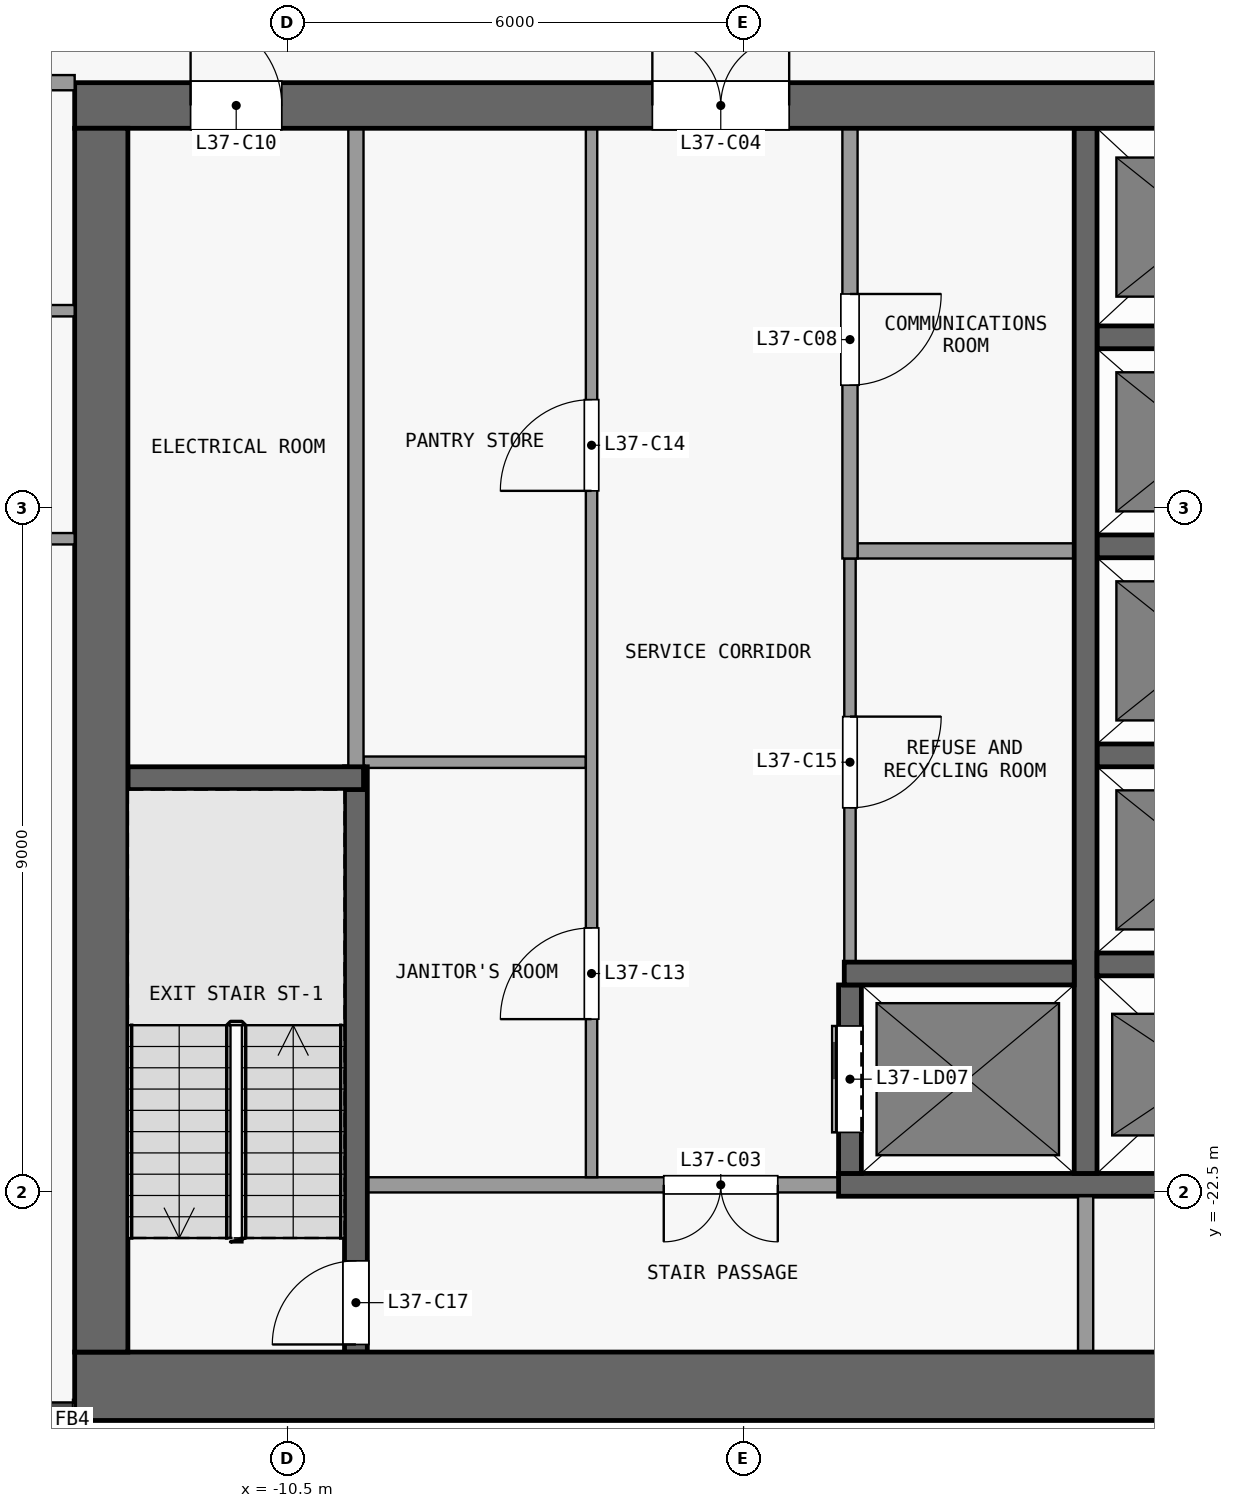
"""IFC4 building model, lengths in metres.
Left out: names, types, materials, properties, quantities, classifications, styles, units other than length and angle.
Written with IfcOpenShell. Run it as: python <this file> out.ifc"""

import sys

from ifc_helpers import new_model, si_unit, direction, frame, frame_2d, origin, place, context, subcontext, project, spatial, rectangle, extrude, element, fill, save


model = new_model("IFC4")
c1 = context("Model", 3, precision=1e-05, world=origin(), true_north=direction((0.0, 1.0)))
c2 = subcontext(c1, "Body", "Model", "MODEL_VIEW")
j1 = project(units=[si_unit("LENGTHUNIT", "METRE"), si_unit("PLANEANGLEUNIT", "RADIAN")], contexts=[c1])
p1 = place(None, origin())
s1 = spatial("IfcSite", under=j1, at=p1, CompositionType="ELEMENT")
p2 = place(p1, origin())
s2 = spatial("IfcBuilding", under=s1, at=p2, CompositionType="ELEMENT")
p3 = place(p2, frame((0.0, 0.0, 152.9)))
s3 = spatial("IfcBuildingStorey", under=s2, at=p3, CompositionType="ELEMENT", Elevation=152.9)
p4 = place(p3, frame((-13.3, -25.05, 0.0), z_axis=(0.0, 0.0, 1.0), x_axis=(1.0, 0.0, 0.0)))
e1 = element("IfcWall", 1, at=p4, inside=s3, PredefinedType="SHEAR", context=c2, shape_type="SweptSolid", body=[
    extrude(rectangle(XDim=26.6, YDim=0.9, at=frame_2d((13.3, 0.0))), origin(), (0.0, 0.0, 1.0), 3.3),
])
p5 = place(p3, frame((-13.3, -8.2, 0.0), z_axis=(0.0, 0.0, 1.0), x_axis=(1.0, 0.0, 0.0)))
e2 = element("IfcWall", 2, at=p5, inside=s3, PredefinedType="SHEAR", context=c2, shape_type="SweptSolid", body=[
    extrude(rectangle(XDim=26.6, YDim=0.6, at=frame_2d((13.3, 0.0))), origin(), (0.0, 0.0, 1.0), 3.3),
])
p6 = place(p5, frame((7.6, 0.0, 0.0)))
e3 = element("IfcOpeningElement", 3, at=p6, cuts=e2, PredefinedType="OPENING", context=c2, shape_type="SweptSolid", body=[
    extrude(rectangle(XDim=1.8, YDim=2.1, at=frame_2d((0.9, 1.05))), frame((0.0, 0.31, 0.0), z_axis=(0.0, -1.0, 0.0), x_axis=(1.0, 0.0, 0.0)), (0.0, 0.0, 1.0), 0.62),
])
p7 = place(p5, frame((17.2, 0.0, 0.0)))
e4 = element("IfcOpeningElement", 4, at=p7, cuts=e2, PredefinedType="OPENING", context=c2, shape_type="SweptSolid", body=[
    extrude(rectangle(XDim=1.8, YDim=2.1, at=frame_2d((0.9, 1.05))), frame((0.0, 0.31, 0.0), z_axis=(0.0, -1.0, 0.0), x_axis=(1.0, 0.0, 0.0)), (0.0, 0.0, 1.0), 0.62),
])
p8 = place(p5, frame((1.525, 0.0, 0.0)))
e5 = element("IfcOpeningElement", 5, at=p8, cuts=e2, PredefinedType="OPENING", context=c2, shape_type="SweptSolid", body=[
    extrude(rectangle(XDim=1.2, YDim=2.1, at=frame_2d((0.6, 1.05))), frame((0.0, 0.31, 0.0), z_axis=(0.0, -1.0, 0.0), x_axis=(1.0, 0.0, 0.0)), (0.0, 0.0, 1.0), 0.62),
])
p9 = place(p5, frame((23.175, 0.0, 0.0)))
e6 = element("IfcOpeningElement", 6, at=p9, cuts=e2, PredefinedType="OPENING", context=c2, shape_type="SweptSolid", body=[
    extrude(rectangle(XDim=0.9, YDim=2.1, at=frame_2d((0.45, 1.05))), frame((0.0, 0.31, 0.0), z_axis=(0.0, -1.0, 0.0), x_axis=(1.0, 0.0, 0.0)), (0.0, 0.0, 1.0), 0.62),
])
p10 = place(p3, frame((-12.95, -24.6, 0.0), z_axis=(0.0, 0.0, 1.0), x_axis=(0.0, 1.0, 0.0)))
e7 = element("IfcWall", 7, at=p10, inside=s3, PredefinedType="SHEAR", context=c2, shape_type="SweptSolid", body=[
    extrude(rectangle(XDim=16.1, YDim=0.7, at=frame_2d((8.05, 0.0))), origin(), (0.0, 0.0, 1.0), 3.3),
])
p11 = place(p3, frame((-3.25, -22.4, 0.0), z_axis=(0.0, 0.0, 1.0), x_axis=(-1.0, 0.0, 0.0)))
e8 = element("IfcWall", 8, at=p11, inside=s3, PredefinedType="PARTITIONING", context=c2, shape_type="SweptSolid", body=[
    extrude(rectangle(XDim=6.2, YDim=0.2, at=frame_2d((3.1, 0.0))), origin(), (0.0, 0.0, 1.0), 3.3),
])
p12 = place(p11, frame((0.8, 0.0, 0.0)))
e9 = element("IfcOpeningElement", 9, at=p12, cuts=e8, PredefinedType="OPENING", context=c2, shape_type="SweptSolid", body=[
    extrude(rectangle(XDim=1.5, YDim=2.1, at=frame_2d((0.75, 1.05))), frame((0.0, 0.11, 0.0), z_axis=(0.0, -1.0, 0.0), x_axis=(1.0, 0.0, 0.0)), (0.0, 0.0, 1.0), 0.22),
])
p13 = place(p3, frame((-3.25, -22.4, 0.0), z_axis=(0.0, 0.0, 1.0), x_axis=(1.0, 0.0, 0.0)))
e10 = element("IfcWall", 10, at=p13, inside=s3, PredefinedType="SHEAR", context=c2, shape_type="SweptSolid", body=[
    extrude(rectangle(XDim=6.2, YDim=0.3, at=frame_2d((3.1, 0.0))), origin(), (0.0, 0.0, 1.0), 3.3),
])
p14 = place(p3, frame((-3.175, -19.62, 0.0), z_axis=(0.0, 0.0, 1.0), x_axis=(1.0, 0.0, 0.0)))
e11 = element("IfcWall", 11, at=p14, inside=s3, PredefinedType="SHEAR", context=c2, shape_type="SweptSolid", body=[
    extrude(rectangle(XDim=3.025, YDim=0.3, at=frame_2d((1.513, 0.0))), origin(), (0.0, 0.0, 1.0), 3.3),
])
p15 = place(p3, frame((0.15, -19.5, 0.0), z_axis=(0.0, 0.0, 1.0), x_axis=(1.0, 0.0, 0.0)))
e12 = element("IfcWall", 12, at=p15, inside=s3, PredefinedType="SHEAR", context=c2, shape_type="SweptSolid", body=[
    extrude(rectangle(XDim=2.8, YDim=0.3, at=frame_2d((1.4, 0.0))), origin(), (0.0, 0.0, 1.0), 3.3),
])
p16 = place(p3, frame((-12.6, -17.05, 0.0), z_axis=(0.0, 0.0, 1.0), x_axis=(1.0, 0.0, 0.0)))
e13 = element("IfcWall", 13, at=p16, inside=s3, PredefinedType="SHEAR", context=c2, shape_type="SweptSolid", body=[
    extrude(rectangle(XDim=3.1, YDim=0.3, at=frame_2d((1.55, 0.0))), origin(), (0.0, 0.0, 1.0), 3.3),
])
p17 = place(p3, frame((-9.5, -16.84, 0.0), z_axis=(0.0, 0.0, 1.0), x_axis=(1.0, 0.0, 0.0)))
e14 = element("IfcWall", 14, at=p17, inside=s3, PredefinedType="PARTITIONING", context=c2, shape_type="SweptSolid", body=[
    extrude(rectangle(XDim=2.925, YDim=0.15, at=frame_2d((1.462, 0.0))), origin(), (0.0, 0.0, 1.0), 3.3),
])
p18 = place(p3, frame((0.15, -16.75, 0.0), z_axis=(0.0, 0.0, 1.0), x_axis=(1.0, 0.0, 0.0)))
e15 = element("IfcWall", 15, at=p18, inside=s3, PredefinedType="SHEAR", context=c2, shape_type="SweptSolid", body=[
    extrude(rectangle(XDim=2.8, YDim=0.3, at=frame_2d((1.4, 0.0))), origin(), (0.0, 0.0, 1.0), 3.3),
])
p19 = place(p3, frame((-3.0, -14.06, 0.0), z_axis=(0.0, 0.0, 1.0), x_axis=(1.0, 0.0, 0.0)))
e16 = element("IfcWall", 16, at=p19, inside=s3, PredefinedType="PARTITIONING", context=c2, shape_type="SweptSolid", body=[
    extrude(rectangle(XDim=2.85, YDim=0.2, at=frame_2d((1.425, 0.0))), origin(), (0.0, 0.0, 1.0), 3.3),
])
for number, where, z_axis, x_axis in (
    (17, (0.15, -14.0, 0.0), (0.0, 0.0, 1.0), (1.0, 0.0, 0.0)),
    (18, (0.15, -11.25, 0.0), (0.0, 0.0, 1.0), (1.0, 0.0, 0.0)),
):
    element("IfcWall", number, at=place(p3, frame(where, z_axis=z_axis, x_axis=x_axis)), inside=s3, PredefinedType="SHEAR", context=c2, shape_type="SweptSolid", body=[
        extrude(rectangle(XDim=2.8, YDim=0.3, at=frame_2d((1.4, 0.0))), origin(), (0.0, 0.0, 1.0), 3.3),
    ])
p20 = place(p3, frame((-9.6, -24.6, 0.0), z_axis=(0.0, 0.0, 1.0), x_axis=(0.0, 1.0, 0.0)))
e19 = element("IfcWall", 19, at=p20, inside=s3, PredefinedType="SHEAR", context=c2, shape_type="SweptSolid", body=[
    extrude(rectangle(XDim=7.7, YDim=0.3, at=frame_2d((3.85, 0.0))), origin(), (0.0, 0.0, 1.0), 3.3),
])
p21 = place(p20, frame((0.1, 0.0, 0.0)))
e20 = element("IfcOpeningElement", 20, at=p21, cuts=e19, PredefinedType="OPENING", context=c2, shape_type="SweptSolid", body=[
    extrude(rectangle(XDim=1.1, YDim=2.1, at=frame_2d((0.55, 1.05))), frame((0.0, 0.16, 0.0), z_axis=(0.0, -1.0, 0.0), x_axis=(1.0, 0.0, 0.0)), (0.0, 0.0, 1.0), 0.32),
])
p22 = place(p3, frame((-9.6, -16.9, 0.0), z_axis=(0.0, 0.0, 1.0), x_axis=(0.0, 1.0, 0.0)))
e21 = element("IfcWall", 21, at=p22, inside=s3, PredefinedType="PARTITIONING", context=c2, shape_type="SweptSolid", body=[
    extrude(rectangle(XDim=8.4, YDim=0.2, at=frame_2d((4.2, 0.0))), origin(), (0.0, 0.0, 1.0), 3.3),
])
p23 = place(p3, frame((-6.5, -22.3, 0.0), z_axis=(0.0, 0.0, 1.0), x_axis=(0.0, 1.0, 0.0)))
e22 = element("IfcWall", 22, at=p23, inside=s3, PredefinedType="PARTITIONING", context=c2, shape_type="SweptSolid", body=[
    extrude(rectangle(XDim=13.8, YDim=0.15, at=frame_2d((6.9, 0.0))), origin(), (0.0, 0.0, 1.0), 3.3),
])
p24 = place(p23, frame((2.08, 0.0, 0.0)))
e23 = element("IfcOpeningElement", 23, at=p24, cuts=e22, PredefinedType="OPENING", context=c2, shape_type="SweptSolid", body=[
    extrude(rectangle(XDim=1.2, YDim=2.1, at=frame_2d((0.6, 1.05))), frame((0.0, 0.085, 0.0), z_axis=(0.0, -1.0, 0.0), x_axis=(1.0, 0.0, 0.0)), (0.0, 0.0, 1.0), 0.17),
])
p25 = place(p23, frame((9.03, 0.0, 0.0)))
e24 = element("IfcOpeningElement", 24, at=p25, cuts=e22, PredefinedType="OPENING", context=c2, shape_type="SweptSolid", body=[
    extrude(rectangle(XDim=1.2, YDim=2.1, at=frame_2d((0.6, 1.05))), frame((0.0, 0.085, 0.0), z_axis=(0.0, -1.0, 0.0), x_axis=(1.0, 0.0, 0.0)), (0.0, 0.0, 1.0), 0.17),
])
p26 = place(p3, frame((-3.1, -22.25, 0.0), z_axis=(0.0, 0.0, 1.0), x_axis=(0.0, 1.0, 0.0)))
e25 = element("IfcWall", 25, at=p26, inside=s3, PredefinedType="SHEAR", context=c2, shape_type="SweptSolid", body=[
    extrude(rectangle(XDim=2.48, YDim=0.3, at=frame_2d((1.24, 0.0))), origin(), (0.0, 0.0, 1.0), 3.3),
])
p27 = place(p26, frame((0.54, 0.0, 0.0)))
e26 = element("IfcOpeningElement", 26, at=p27, cuts=e25, PredefinedType="OPENING", context=c2, shape_type="SweptSolid", body=[
    extrude(rectangle(XDim=1.4, YDim=2.1, at=frame_2d((0.7, 1.05))), frame((0.0, 0.16, 0.0), z_axis=(0.0, -1.0, 0.0), x_axis=(1.0, 0.0, 0.0)), (0.0, 0.0, 1.0), 0.32),
])
p28 = place(p3, frame((-3.1, -14.16, 0.0), z_axis=(0.0, 0.0, 1.0), x_axis=(0.0, -1.0, 0.0)))
e27 = element("IfcWall", 27, at=p28, inside=s3, PredefinedType="PARTITIONING", context=c2, shape_type="SweptSolid", body=[
    extrude(rectangle(XDim=5.31, YDim=0.15, at=frame_2d((2.655, 0.0))), origin(), (0.0, 0.0, 1.0), 3.3),
])
p29 = place(p28, frame((2.08, 0.0, 0.0)))
e28 = element("IfcOpeningElement", 28, at=p29, cuts=e27, PredefinedType="OPENING", context=c2, shape_type="SweptSolid", body=[
    extrude(rectangle(XDim=1.2, YDim=2.1, at=frame_2d((0.6, 1.05))), frame((0.0, 0.085, 0.0), z_axis=(0.0, -1.0, 0.0), x_axis=(1.0, 0.0, 0.0)), (0.0, 0.0, 1.0), 0.17),
])
p30 = place(p3, frame((-3.1, -8.5, 0.0), z_axis=(0.0, 0.0, 1.0), x_axis=(0.0, -1.0, 0.0)))
e29 = element("IfcWall", 29, at=p30, inside=s3, PredefinedType="PARTITIONING", context=c2, shape_type="SweptSolid", body=[
    extrude(rectangle(XDim=5.66, YDim=0.2, at=frame_2d((2.83, 0.0))), origin(), (0.0, 0.0, 1.0), 3.3),
])
p31 = place(p30, frame((2.18, 0.0, 0.0)))
e30 = element("IfcOpeningElement", 30, at=p31, cuts=e29, PredefinedType="OPENING", context=c2, shape_type="SweptSolid", body=[
    extrude(rectangle(XDim=1.2, YDim=2.1, at=frame_2d((0.6, 1.05))), frame((0.0, 0.11, 0.0), z_axis=(0.0, -1.0, 0.0), x_axis=(1.0, 0.0, 0.0)), (0.0, 0.0, 1.0), 0.22),
])
p32 = place(p3, frame((0.0, -24.6, 0.0), z_axis=(0.0, 0.0, 1.0), x_axis=(0.0, 1.0, 0.0)))
e31 = element("IfcWall", 31, at=p32, inside=s3, PredefinedType="PARTITIONING", context=c2, shape_type="SweptSolid", body=[
    extrude(rectangle(XDim=2.05, YDim=0.2, at=frame_2d((1.025, 0.0))), origin(), (0.0, 0.0, 1.0), 3.3),
])
p33 = place(p3, frame((0.0, -22.25, 0.0), z_axis=(0.0, 0.0, 1.0), x_axis=(0.0, 1.0, 0.0)))
e32 = element("IfcWall", 32, at=p33, inside=s3, PredefinedType="SHEAR", context=c2, shape_type="SweptSolid", body=[
    extrude(rectangle(XDim=13.75, YDim=0.3, at=frame_2d((6.875, 0.0))), origin(), (0.0, 0.0, 1.0), 3.3),
])
p34 = place(p3, frame((-19.262, -13.9, 0.0), z_axis=(0.0, 0.0, 1.0), x_axis=(1.0, 0.0, 0.0)))
e33 = element("IfcWall", 33, at=p34, inside=s3, PredefinedType="PARTITIONING", context=c2, shape_type="SweptSolid", body=[
    extrude(rectangle(XDim=5.962, YDim=0.15, at=frame_2d((2.981, 0.0))), origin(), (0.0, 0.0, 1.0), 3.3),
])
p35 = place(p34, frame((0.512, 0.0, 0.0)))
e34 = element("IfcOpeningElement", 34, at=p35, cuts=e33, PredefinedType="OPENING", context=c2, shape_type="SweptSolid", body=[
    extrude(rectangle(XDim=0.9, YDim=2.1, at=frame_2d((0.45, 1.05))), frame((0.0, 0.085, 0.0), z_axis=(0.0, -1.0, 0.0), x_axis=(1.0, 0.0, 0.0)), (0.0, 0.0, 1.0), 0.17),
])
p36 = place(p3, frame((-19.262, -10.9, 0.0), z_axis=(0.0, 0.0, 1.0), x_axis=(1.0, 0.0, 0.0)))
e35 = element("IfcWall", 35, at=p36, inside=s3, PredefinedType="PARTITIONING", context=c2, shape_type="SweptSolid", body=[
    extrude(rectangle(XDim=5.962, YDim=0.15, at=frame_2d((2.981, 0.0))), origin(), (0.0, 0.0, 1.0), 3.3),
])
p37 = place(p36, frame((1.012, 0.0, 0.0)))
e36 = element("IfcOpeningElement", 36, at=p37, cuts=e35, PredefinedType="OPENING", context=c2, shape_type="SweptSolid", body=[
    extrude(rectangle(XDim=0.9, YDim=2.1, at=frame_2d((0.45, 1.05))), frame((0.0, 0.085, 0.0), z_axis=(0.0, -1.0, 0.0), x_axis=(1.0, 0.0, 0.0)), (0.0, 0.0, 1.0), 0.17),
])
p38 = place(p36, frame((3.963, 0.0, 0.0)))
e37 = element("IfcOpeningElement", 37, at=p38, cuts=e35, PredefinedType="OPENING", context=c2, shape_type="SweptSolid", body=[
    extrude(rectangle(XDim=0.9, YDim=2.1, at=frame_2d((0.45, 1.05))), frame((0.0, 0.085, 0.0), z_axis=(0.0, -1.0, 0.0), x_axis=(1.0, 0.0, 0.0)), (0.0, 0.0, 1.0), 0.17),
])
p39 = place(p3, frame((-19.262, -7.9, 0.0), z_axis=(0.0, 0.0, 1.0), x_axis=(1.0, 0.0, 0.0)))
e38 = element("IfcWall", 38, at=p39, inside=s3, PredefinedType="PARTITIONING", context=c2, shape_type="SweptSolid", body=[
    extrude(rectangle(XDim=5.962, YDim=0.2, at=frame_2d((2.981, 0.0))), origin(), (0.0, 0.0, 1.0), 3.3),
])
p40 = place(p39, frame((2.412, 0.0, 0.0)))
e39 = element("IfcOpeningElement", 39, at=p40, cuts=e38, PredefinedType="OPENING", context=c2, shape_type="SweptSolid", body=[
    extrude(rectangle(XDim=1.0, YDim=2.1, at=frame_2d((0.5, 1.05))), frame((0.0, 0.11, 0.0), z_axis=(0.0, -1.0, 0.0), x_axis=(1.0, 0.0, 0.0)), (0.0, 0.0, 1.0), 0.22),
])
p41 = place(p27, origin())
e40 = element("IfcDoor", 40, at=p41, inside=s3, OperationType="DOUBLE_DOOR_SLIDING", PredefinedType="DOOR", context=c2, shape_type="SweptSolid", body=[
    extrude(rectangle(XDim=1.4, YDim=2.1, at=frame_2d((0.7, 1.05))), frame((0.0, 0.025, 0.0), z_axis=(0.0, -1.0, 0.0), x_axis=(1.0, 0.0, 0.0)), (0.0, 0.0, 1.0), 0.05),
])
fill(e26, e40)
p42 = place(p12, origin())
e41 = element("IfcDoor", 41, at=p42, inside=s3, OperationType="DOUBLE_DOOR_SINGLE_SWING", PredefinedType="DOOR", context=c2, shape_type="SweptSolid", body=[
    extrude(rectangle(XDim=1.5, YDim=2.1, at=frame_2d((0.75, 1.05))), frame((0.0, 0.025, 0.0), z_axis=(0.0, -1.0, 0.0), x_axis=(1.0, 0.0, 0.0)), (0.0, 0.0, 1.0), 0.05),
])
fill(e9, e41)
p43 = place(p6, origin())
e42 = element("IfcDoor", 42, at=p43, inside=s3, OperationType="DOUBLE_DOOR_SINGLE_SWING", PredefinedType="DOOR", context=c2, shape_type="SweptSolid", body=[
    extrude(rectangle(XDim=1.8, YDim=2.1, at=frame_2d((0.9, 1.05))), frame((0.0, 0.025, 0.0), z_axis=(0.0, -1.0, 0.0), x_axis=(1.0, 0.0, 0.0)), (0.0, 0.0, 1.0), 0.05),
])
fill(e3, e42)
p44 = place(p31, origin())
e43 = element("IfcDoor", 43, at=p44, inside=s3, OperationType="SINGLE_SWING_LEFT", PredefinedType="DOOR", context=c2, shape_type="SweptSolid", body=[
    extrude(rectangle(XDim=1.2, YDim=2.1, at=frame_2d((0.6, 1.05))), frame((0.0, 0.025, 0.0), z_axis=(0.0, -1.0, 0.0), x_axis=(1.0, 0.0, 0.0)), (0.0, 0.0, 1.0), 0.05),
])
fill(e30, e43)
p45 = place(p8, origin())
e44 = element("IfcDoor", 44, at=p45, inside=s3, OperationType="SINGLE_SWING_LEFT", PredefinedType="DOOR", context=c2, shape_type="SweptSolid", body=[
    extrude(rectangle(XDim=1.2, YDim=2.1, at=frame_2d((0.6, 1.05))), frame((0.0, 0.025, 0.0), z_axis=(0.0, -1.0, 0.0), x_axis=(1.0, 0.0, 0.0)), (0.0, 0.0, 1.0), 0.05),
])
fill(e5, e44)
p46 = place(p24, origin())
e45 = element("IfcDoor", 45, at=p46, inside=s3, OperationType="SINGLE_SWING_LEFT", PredefinedType="DOOR", context=c2, shape_type="SweptSolid", body=[
    extrude(rectangle(XDim=1.2, YDim=2.1, at=frame_2d((0.6, 1.05))), frame((0.0, 0.025, 0.0), z_axis=(0.0, -1.0, 0.0), x_axis=(1.0, 0.0, 0.0)), (0.0, 0.0, 1.0), 0.05),
])
fill(e23, e45)
p47 = place(p25, origin())
e46 = element("IfcDoor", 46, at=p47, inside=s3, OperationType="SINGLE_SWING_LEFT", PredefinedType="DOOR", context=c2, shape_type="SweptSolid", body=[
    extrude(rectangle(XDim=1.2, YDim=2.1, at=frame_2d((0.6, 1.05))), frame((0.0, 0.025, 0.0), z_axis=(0.0, -1.0, 0.0), x_axis=(1.0, 0.0, 0.0)), (0.0, 0.0, 1.0), 0.05),
])
fill(e24, e46)
p48 = place(p29, origin())
e47 = element("IfcDoor", 47, at=p48, inside=s3, OperationType="SINGLE_SWING_LEFT", PredefinedType="DOOR", context=c2, shape_type="SweptSolid", body=[
    extrude(rectangle(XDim=1.2, YDim=2.1, at=frame_2d((0.6, 1.05))), frame((0.0, 0.025, 0.0), z_axis=(0.0, -1.0, 0.0), x_axis=(1.0, 0.0, 0.0)), (0.0, 0.0, 1.0), 0.05),
])
fill(e28, e47)
p49 = place(p21, origin())
e48 = element("IfcDoor", 48, at=p49, inside=s3, OperationType="SINGLE_SWING_LEFT", PredefinedType="DOOR", context=c2, shape_type="SweptSolid", body=[
    extrude(rectangle(XDim=1.1, YDim=2.1, at=frame_2d((0.55, 1.05))), frame((0.0, 0.025, 0.0), z_axis=(0.0, -1.0, 0.0), x_axis=(1.0, 0.0, 0.0)), (0.0, 0.0, 1.0), 0.05),
])
fill(e20, e48)
save(model, sys.argv[1])
